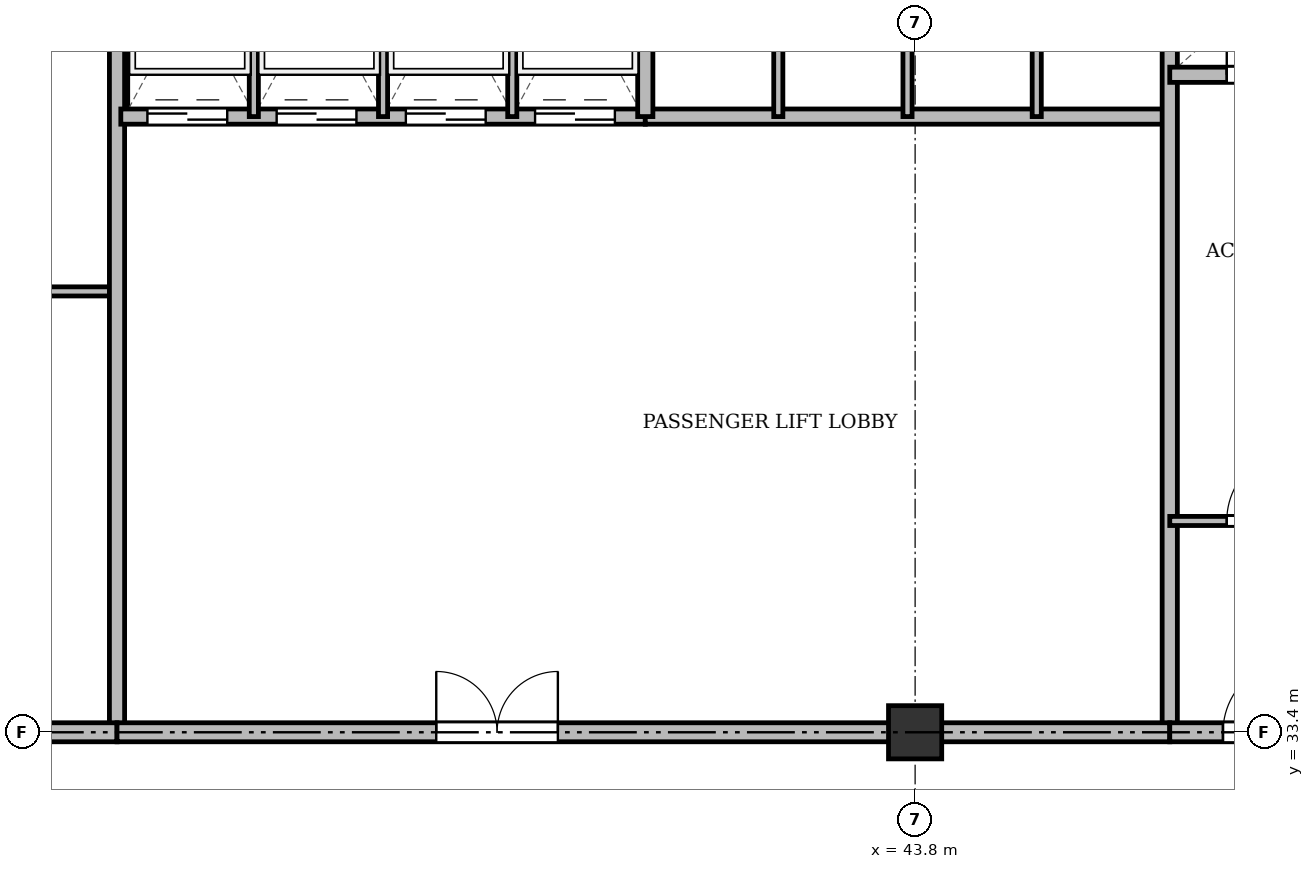
"""IFC4 building model, lengths in metres.
Left out: names, types, materials, properties, quantities, classifications, styles, units other than length and angle.
Written with IfcOpenShell. Run it as: python <this file> out.ifc"""

import sys

from ifc_helpers import new_model, si_unit, direction, frame, frame_2d, origin, origin_2d, place, context, subcontext, project, spatial, rectangle, extrude, source, transform, mapped, element, fill, save


model = new_model("IFC4")
c1 = context("Model", 3, precision=1e-05, world=origin(), true_north=direction((0.0, 1.0)))
c2 = subcontext(c1, "Body", "Model", "MODEL_VIEW")
j1 = project(units=[si_unit("LENGTHUNIT", "METRE"), si_unit("PLANEANGLEUNIT", "RADIAN")], contexts=[c1])
p1 = place(None, origin())
s1 = spatial("IfcSite", under=j1, at=p1, CompositionType="ELEMENT")
p2 = place(p1, origin())
s2 = spatial("IfcBuilding", under=s1, at=p2, CompositionType="ELEMENT")
p3 = place(p2, frame((0.0, 0.0, 208.5)))
s3 = spatial("IfcBuildingStorey", under=s2, at=p3, CompositionType="ELEMENT", Elevation=208.5)
m1 = source(origin(), c2, "Body", "SweptSolid", [
    extrude(rectangle(XDim=0.7, YDim=0.7, at=origin_2d()), origin(), (0.0, 0.0, 1.0), 3.6),
])
p4 = place(p3, frame((43.8, 33.4, 0.0), z_axis=(0.0, 0.0, 1.0), x_axis=(1.0, 0.0, 0.0)))
e1 = element("IfcColumn", 1, at=p4, inside=s3, PredefinedType="COLUMN", context=c2, shape_type="MappedRepresentation", body=[
    mapped(m1, transform((0.0, 0.0, 0.0), x_axis=(1.0, 0.0, 0.0), y_axis=(0.0, 1.0, 0.0), z_axis=(0.0, 0.0, 1.0), scale=1.0)),
])
p5 = place(p3, frame((26.3, 39.2, 0.0), z_axis=(0.0, 0.0, 1.0), x_axis=(1.0, 0.0, 0.0)))
e2 = element("IfcWall", 2, at=p5, inside=s3, PredefinedType="PARTITIONING", context=c2, shape_type="SweptSolid", body=[
    extrude(rectangle(XDim=7.0, YDim=0.12, at=frame_2d((3.5, 0.0))), origin(), (0.0, 0.0, 1.0), 2.86),
])
p6 = place(p5, frame((2.6, 0.0, 0.0)))
e3 = element("IfcOpeningElement", 3, at=p6, cuts=e2, PredefinedType="OPENING", context=c2, shape_type="SweptSolid", body=[
    extrude(rectangle(XDim=0.95, YDim=2.15, at=frame_2d((0.475, 1.075))), frame((0.0, 0.07, 0.0), z_axis=(0.0, -1.0, 0.0), x_axis=(1.0, 0.0, 0.0)), (0.0, 0.0, 1.0), 0.14),
])
p7 = place(p3, frame((33.3, 33.4, 0.0), z_axis=(0.0, 0.0, 1.0), x_axis=(0.0, 1.0, 0.0)))
e4 = element("IfcWall", 4, at=p7, inside=s3, PredefinedType="SOLIDWALL", context=c2, shape_type="SweptSolid", body=[
    extrude(rectangle(XDim=11.3, YDim=0.2, at=frame_2d((5.65, 0.0))), origin(), (0.0, 0.0, 1.0), 2.91),
])
p8 = place(p3, frame((33.35, 41.5, 0.0), z_axis=(0.0, 0.0, 1.0), x_axis=(1.0, 0.0, 0.0)))
e5 = element("IfcWall", 5, at=p8, inside=s3, PredefinedType="SOLIDWALL", context=c2, shape_type="SweptSolid", body=[
    extrude(rectangle(XDim=6.9, YDim=0.2, at=frame_2d((3.45, 0.0))), origin(), (0.0, 0.0, 1.0), 3.36),
])
p9 = place(p8, frame((0.35, 0.0, 0.0)))
e6 = element("IfcOpeningElement", 6, at=p9, cuts=e5, PredefinedType="OPENING", context=c2, shape_type="SweptSolid", body=[
    extrude(rectangle(XDim=1.05, YDim=2.15, at=frame_2d((0.525, 1.075))), frame((0.0, 0.11, 0.0), z_axis=(0.0, -1.0, 0.0), x_axis=(1.0, 0.0, 0.0)), (0.0, 0.0, 1.0), 0.22),
])
p10 = place(p8, frame((2.05, 0.0, 0.0)))
e7 = element("IfcOpeningElement", 7, at=p10, cuts=e5, PredefinedType="OPENING", context=c2, shape_type="SweptSolid", body=[
    extrude(rectangle(XDim=1.05, YDim=2.15, at=frame_2d((0.525, 1.075))), frame((0.0, 0.11, 0.0), z_axis=(0.0, -1.0, 0.0), x_axis=(1.0, 0.0, 0.0)), (0.0, 0.0, 1.0), 0.22),
])
p11 = place(p8, frame((3.75, 0.0, 0.0)))
e8 = element("IfcOpeningElement", 8, at=p11, cuts=e5, PredefinedType="OPENING", context=c2, shape_type="SweptSolid", body=[
    extrude(rectangle(XDim=1.05, YDim=2.15, at=frame_2d((0.525, 1.075))), frame((0.0, 0.11, 0.0), z_axis=(0.0, -1.0, 0.0), x_axis=(1.0, 0.0, 0.0)), (0.0, 0.0, 1.0), 0.22),
])
p12 = place(p8, frame((5.45, 0.0, 0.0)))
e9 = element("IfcOpeningElement", 9, at=p12, cuts=e5, PredefinedType="OPENING", context=c2, shape_type="SweptSolid", body=[
    extrude(rectangle(XDim=1.05, YDim=2.15, at=frame_2d((0.525, 1.075))), frame((0.0, 0.11, 0.0), z_axis=(0.0, -1.0, 0.0), x_axis=(1.0, 0.0, 0.0)), (0.0, 0.0, 1.0), 0.22),
])
for number, where, z_axis, x_axis in (
    (10, (35.1, 41.5, 0.0), (0.0, 0.0, 1.0), (0.0, 1.0, 0.0)),
    (11, (36.8, 41.5, 0.0), (0.0, 0.0, 1.0), (0.0, 1.0, 0.0)),
    (12, (38.5, 41.5, 0.0), (0.0, 0.0, 1.0), (0.0, 1.0, 0.0)),
):
    element("IfcWall", number, at=place(p3, frame(where, z_axis=z_axis, x_axis=x_axis)), inside=s3, PredefinedType="PARTITIONING", context=c2, shape_type="SweptSolid", body=[
        extrude(rectangle(XDim=3.2, YDim=0.12, at=frame_2d((1.6, 0.0))), origin(), (0.0, 0.0, 1.0), 3.36),
    ])
p13 = place(p3, frame((40.25, 41.5, 0.0), z_axis=(0.0, 0.0, 1.0), x_axis=(1.0, 0.0, 0.0)))
e13 = element("IfcWall", 13, at=p13, inside=s3, PredefinedType="SOLIDWALL", context=c2, shape_type="SweptSolid", body=[
    extrude(rectangle(XDim=6.9, YDim=0.2, at=frame_2d((3.45, 0.0))), origin(), (0.0, 0.0, 1.0), 2.86),
])
p14 = place(p3, frame((40.25, 41.5, 0.0), z_axis=(0.0, 0.0, 1.0), x_axis=(0.0, 1.0, 0.0)))
e14 = element("IfcWall", 14, at=p14, inside=s3, PredefinedType="SOLIDWALL", context=c2, shape_type="SweptSolid", body=[
    extrude(rectangle(XDim=3.2, YDim=0.2, at=frame_2d((1.6, 0.0))), origin(), (0.0, 0.0, 1.0), 3.36),
])
p15 = place(p3, frame((42.0, 41.5, 0.0), z_axis=(0.0, 0.0, 1.0), x_axis=(0.0, 1.0, 0.0)))
e15 = element("IfcWall", 15, at=p15, inside=s3, PredefinedType="PARTITIONING", context=c2, shape_type="SweptSolid", body=[
    extrude(rectangle(XDim=3.2, YDim=0.12, at=frame_2d((1.6, 0.0))), origin(), (0.0, 0.0, 1.0), 3.36),
])
p16 = place(p3, frame((43.7, 41.5, 0.0), z_axis=(0.0, 0.0, 1.0), x_axis=(0.0, 1.0, 0.0)))
e16 = element("IfcWall", 16, at=p16, inside=s3, PredefinedType="PARTITIONING", context=c2, shape_type="SweptSolid", body=[
    extrude(rectangle(XDim=3.2, YDim=0.12, at=frame_2d((1.6, 0.0))), origin(), (0.0, 0.0, 1.0), 2.86),
])
p17 = place(p3, frame((45.4, 41.5, 0.0), z_axis=(0.0, 0.0, 1.0), x_axis=(0.0, 1.0, 0.0)))
e17 = element("IfcWall", 17, at=p17, inside=s3, PredefinedType="PARTITIONING", context=c2, shape_type="SweptSolid", body=[
    extrude(rectangle(XDim=3.2, YDim=0.12, at=frame_2d((1.6, 0.0))), origin(), (0.0, 0.0, 1.0), 3.36),
])
p18 = place(p3, frame((47.15, 33.4, 0.0), z_axis=(0.0, 0.0, 1.0), x_axis=(0.0, 1.0, 0.0)))
e18 = element("IfcWall", 18, at=p18, inside=s3, PredefinedType="SOLIDWALL", context=c2, shape_type="SweptSolid", body=[
    extrude(rectangle(XDim=11.3, YDim=0.2, at=frame_2d((5.65, 0.0))), origin(), (0.0, 0.0, 1.0), 2.91),
])
p19 = place(p3, frame((26.3, 33.4, 0.0), z_axis=(0.0, 0.0, 1.0), x_axis=(1.0, 0.0, 0.0)))
e19 = element("IfcWall", 19, at=p19, inside=s3, PredefinedType="PARTITIONING", context=c2, shape_type="SweptSolid", body=[
    extrude(rectangle(XDim=7.0, YDim=0.25, at=frame_2d((3.5, 0.0))), origin(), (0.0, 0.0, 1.0), 2.91),
])
p20 = place(p19, frame((1.35, 0.0, 0.0)))
e20 = element("IfcOpeningElement", 20, at=p20, cuts=e19, PredefinedType="OPENING", context=c2, shape_type="SweptSolid", body=[
    extrude(rectangle(XDim=0.95, YDim=2.15, at=frame_2d((0.475, 1.075))), frame((0.0, 0.135, 0.0), z_axis=(0.0, -1.0, 0.0), x_axis=(1.0, 0.0, 0.0)), (0.0, 0.0, 1.0), 0.27),
])
p21 = place(p3, frame((33.3, 33.4, 0.0), z_axis=(0.0, 0.0, 1.0), x_axis=(1.0, 0.0, 0.0)))
e21 = element("IfcWall", 21, at=p21, inside=s3, PredefinedType="PARTITIONING", context=c2, shape_type="SweptSolid", body=[
    extrude(rectangle(XDim=13.85, YDim=0.25, at=frame_2d((6.925, 0.0))), origin(), (0.0, 0.0, 1.0), 2.91),
])
p22 = place(p21, frame((4.2, 0.0, 0.0)))
e22 = element("IfcOpeningElement", 22, at=p22, cuts=e21, PredefinedType="OPENING", context=c2, shape_type="SweptSolid", body=[
    extrude(rectangle(XDim=1.6, YDim=2.2, at=frame_2d((0.8, 1.1))), frame((0.0, 0.135, 0.0), z_axis=(0.0, -1.0, 0.0), x_axis=(1.0, 0.0, 0.0)), (0.0, 0.0, 1.0), 0.27),
])
p23 = place(p3, frame((47.15, 42.05, 0.0), z_axis=(0.0, 0.0, 1.0), x_axis=(1.0, 0.0, 0.0)))
e23 = element("IfcWall", 23, at=p23, inside=s3, PredefinedType="SOLIDWALL", context=c2, shape_type="SweptSolid", body=[
    extrude(rectangle(XDim=7.85, YDim=0.2, at=frame_2d((3.925, 0.0))), origin(), (0.0, 0.0, 1.0), 2.86),
])
p24 = place(p23, frame((0.75, 0.0, 0.0)))
e24 = element("IfcOpeningElement", 24, at=p24, cuts=e23, PredefinedType="OPENING", context=c2, shape_type="SweptSolid", body=[
    extrude(rectangle(XDim=0.9, YDim=2.1, at=frame_2d((0.45, 1.05))), frame((0.0, 0.11, 0.0), z_axis=(0.0, -1.0, 0.0), x_axis=(1.0, 0.0, 0.0)), (0.0, 0.0, 1.0), 0.22),
])
p25 = place(p23, frame((3.85, 0.0, 0.0)))
e25 = element("IfcOpeningElement", 25, at=p25, cuts=e23, PredefinedType="OPENING", context=c2, shape_type="SweptSolid", body=[
    extrude(rectangle(XDim=0.9, YDim=2.1, at=frame_2d((0.45, 1.05))), frame((0.0, 0.11, 0.0), z_axis=(0.0, -1.0, 0.0), x_axis=(1.0, 0.0, 0.0)), (0.0, 0.0, 1.0), 0.22),
])
p26 = place(p3, frame((47.15, 36.18, 0.0), z_axis=(0.0, 0.0, 1.0), x_axis=(1.0, 0.0, 0.0)))
e26 = element("IfcWall", 26, at=p26, inside=s3, PredefinedType="PARTITIONING", context=c2, shape_type="SweptSolid", body=[
    extrude(rectangle(XDim=5.3, YDim=0.12, at=frame_2d((2.65, 0.0))), origin(), (0.0, 0.0, 1.0), 2.86),
])
p27 = place(p26, frame((0.75, 0.0, 0.0)))
e27 = element("IfcOpeningElement", 27, at=p27, cuts=e26, PredefinedType="OPENING", context=c2, shape_type="SweptSolid", body=[
    extrude(rectangle(XDim=0.95, YDim=2.15, at=frame_2d((0.475, 1.075))), frame((0.0, 0.07, 0.0), z_axis=(0.0, -1.0, 0.0), x_axis=(1.0, 0.0, 0.0)), (0.0, 0.0, 1.0), 0.14),
])
p28 = place(p26, frame((3.45, 0.0, 0.0)))
e28 = element("IfcOpeningElement", 28, at=p28, cuts=e26, PredefinedType="OPENING", context=c2, shape_type="SweptSolid", body=[
    extrude(rectangle(XDim=0.95, YDim=2.15, at=frame_2d((0.475, 1.075))), frame((0.0, 0.07, 0.0), z_axis=(0.0, -1.0, 0.0), x_axis=(1.0, 0.0, 0.0)), (0.0, 0.0, 1.0), 0.14),
])
p29 = place(p3, frame((47.15, 33.4, 0.0), z_axis=(0.0, 0.0, 1.0), x_axis=(1.0, 0.0, 0.0)))
e29 = element("IfcWall", 29, at=p29, inside=s3, PredefinedType="PARTITIONING", context=c2, shape_type="SweptSolid", body=[
    extrude(rectangle(XDim=11.15, YDim=0.25, at=frame_2d((5.575, 0.0))), origin(), (0.0, 0.0, 1.0), 2.91),
])
p30 = place(p29, frame((0.7, 0.0, 0.0)))
e30 = element("IfcOpeningElement", 30, at=p30, cuts=e29, PredefinedType="OPENING", context=c2, shape_type="SweptSolid", body=[
    extrude(rectangle(XDim=0.95, YDim=2.15, at=frame_2d((0.475, 1.075))), frame((0.0, 0.135, 0.0), z_axis=(0.0, -1.0, 0.0), x_axis=(1.0, 0.0, 0.0)), (0.0, 0.0, 1.0), 0.27),
])
p31 = place(p29, frame((6.0, 0.0, 0.0)))
e31 = element("IfcOpeningElement", 31, at=p31, cuts=e29, PredefinedType="OPENING", context=c2, shape_type="SweptSolid", body=[
    extrude(rectangle(XDim=1.2, YDim=2.15, at=frame_2d((0.6, 1.075))), frame((0.0, 0.135, 0.0), z_axis=(0.0, -1.0, 0.0), x_axis=(1.0, 0.0, 0.0)), (0.0, 0.0, 1.0), 0.27),
])
m2 = source(origin(), c2, "Body", "SweptSolid", [
    extrude(rectangle(XDim=1.05, YDim=2.15, at=frame_2d((0.525, 1.075))), frame((0.0, 0.025, 0.0), z_axis=(0.0, -1.0, 0.0), x_axis=(1.0, 0.0, 0.0)), (0.0, 0.0, 1.0), 0.05),
])
p32 = place(p9, origin())
e32 = element("IfcDoor", 32, at=p32, inside=s3, OperationType="DOUBLE_DOOR_SLIDING", PredefinedType="DOOR", context=c2, shape_type="MappedRepresentation", body=[
    mapped(m2, transform((0.0, 0.0, 0.0), x_axis=(1.0, 0.0, 0.0), y_axis=(0.0, 1.0, 0.0), z_axis=(0.0, 0.0, 1.0), scale=1.0)),
])
fill(e6, e32)
p33 = place(p10, origin())
e33 = element("IfcDoor", 33, at=p33, inside=s3, OperationType="DOUBLE_DOOR_SLIDING", PredefinedType="DOOR", context=c2, shape_type="MappedRepresentation", body=[
    mapped(m2, transform((0.0, 0.0, 0.0), x_axis=(1.0, 0.0, 0.0), y_axis=(0.0, 1.0, 0.0), z_axis=(0.0, 0.0, 1.0), scale=1.0)),
])
fill(e7, e33)
p34 = place(p11, origin())
e34 = element("IfcDoor", 34, at=p34, inside=s3, OperationType="DOUBLE_DOOR_SLIDING", PredefinedType="DOOR", context=c2, shape_type="MappedRepresentation", body=[
    mapped(m2, transform((0.0, 0.0, 0.0), x_axis=(1.0, 0.0, 0.0), y_axis=(0.0, 1.0, 0.0), z_axis=(0.0, 0.0, 1.0), scale=1.0)),
])
fill(e8, e34)
p35 = place(p12, origin())
e35 = element("IfcDoor", 35, at=p35, inside=s3, OperationType="DOUBLE_DOOR_SLIDING", PredefinedType="DOOR", context=c2, shape_type="MappedRepresentation", body=[
    mapped(m2, transform((0.0, 0.0, 0.0), x_axis=(1.0, 0.0, 0.0), y_axis=(0.0, 1.0, 0.0), z_axis=(0.0, 0.0, 1.0), scale=1.0)),
])
fill(e9, e35)
m3 = source(origin(), c2, "Body", "SweptSolid", [
    extrude(rectangle(XDim=1.6, YDim=2.2, at=frame_2d((0.8, 1.1))), frame((0.0, 0.025, 0.0), z_axis=(0.0, -1.0, 0.0), x_axis=(1.0, 0.0, 0.0)), (0.0, 0.0, 1.0), 0.05),
])
p36 = place(p22, origin())
e36 = element("IfcDoor", 36, at=p36, inside=s3, OperationType="DOUBLE_DOOR_SINGLE_SWING", PredefinedType="DOOR", context=c2, shape_type="MappedRepresentation", body=[
    mapped(m3, transform((0.0, 0.0, 0.0), x_axis=(1.0, 0.0, 0.0), y_axis=(0.0, 1.0, 0.0), z_axis=(0.0, 0.0, 1.0), scale=1.0)),
])
fill(e22, e36)
m4 = source(origin(), c2, "Body", "SweptSolid", [
    extrude(rectangle(XDim=0.9, YDim=2.1, at=frame_2d((0.45, 1.05))), frame((0.0, 0.025, 0.0), z_axis=(0.0, -1.0, 0.0), x_axis=(1.0, 0.0, 0.0)), (0.0, 0.0, 1.0), 0.05),
])
p37 = place(p24, origin())
e37 = element("IfcDoor", 37, at=p37, inside=s3, OperationType="SINGLE_SWING_LEFT", PredefinedType="DOOR", context=c2, shape_type="MappedRepresentation", body=[
    mapped(m4, transform((0.0, 0.0, 0.0), x_axis=(1.0, 0.0, 0.0), y_axis=(0.0, 1.0, 0.0), z_axis=(0.0, 0.0, 1.0), scale=1.0)),
])
fill(e24, e37)
m5 = source(origin(), c2, "Body", "SweptSolid", [
    extrude(rectangle(XDim=0.95, YDim=2.15, at=frame_2d((0.475, 1.075))), frame((0.0, 0.025, 0.0), z_axis=(0.0, -1.0, 0.0), x_axis=(1.0, 0.0, 0.0)), (0.0, 0.0, 1.0), 0.05),
])
p38 = place(p27, origin())
e38 = element("IfcDoor", 38, at=p38, inside=s3, OperationType="SINGLE_SWING_RIGHT", PredefinedType="DOOR", context=c2, shape_type="MappedRepresentation", body=[
    mapped(m5, transform((0.0, 0.0, 0.0), x_axis=(1.0, 0.0, 0.0), y_axis=(0.0, 1.0, 0.0), z_axis=(0.0, 0.0, 1.0), scale=1.0)),
])
fill(e27, e38)
p39 = place(p30, origin())
e39 = element("IfcDoor", 39, at=p39, inside=s3, OperationType="SINGLE_SWING_RIGHT", PredefinedType="DOOR", context=c2, shape_type="MappedRepresentation", body=[
    mapped(m5, transform((0.0, 0.0, 0.0), x_axis=(1.0, 0.0, 0.0), y_axis=(0.0, 1.0, 0.0), z_axis=(0.0, 0.0, 1.0), scale=1.0)),
])
fill(e30, e39)
save(model, sys.argv[1])
